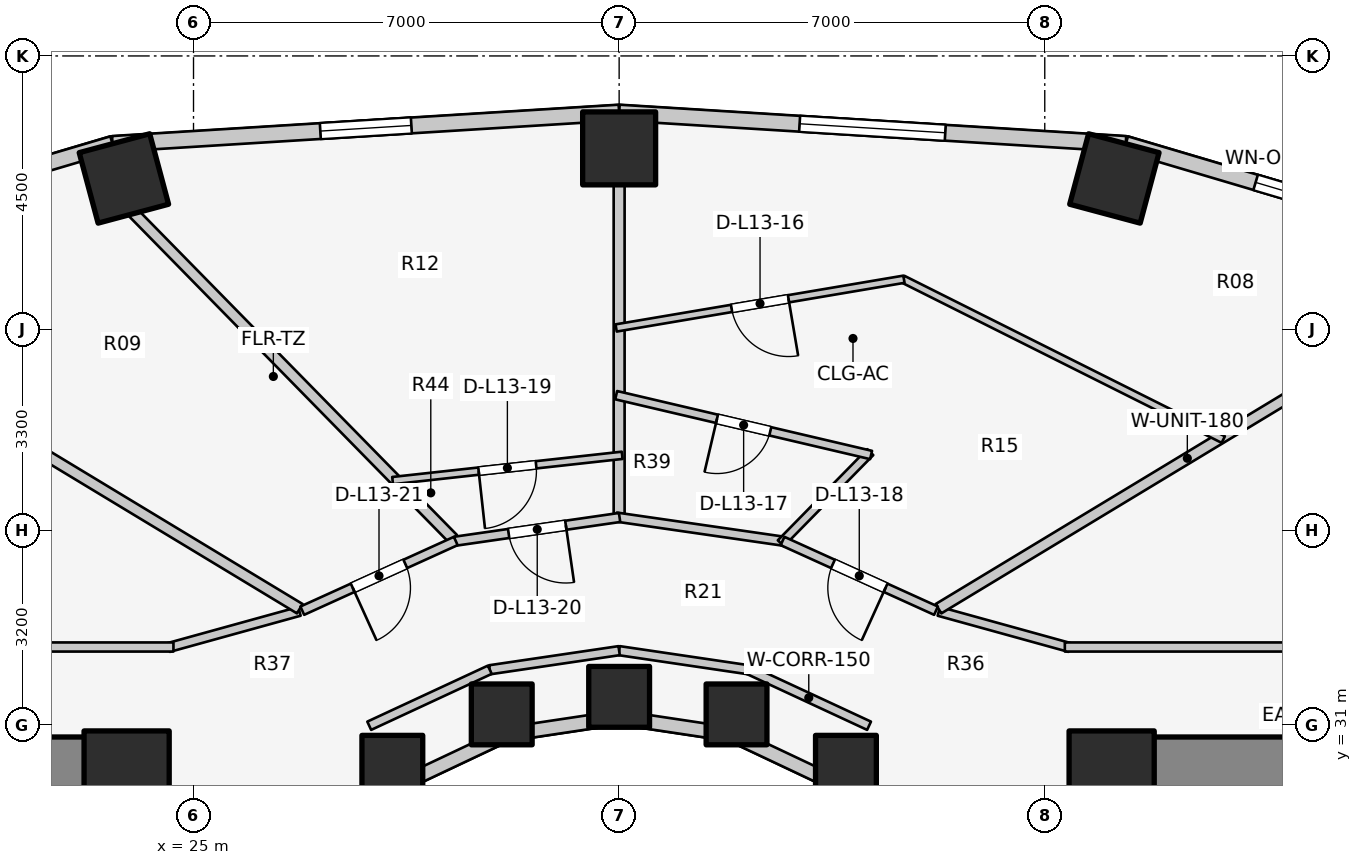
"""IFC4 building model, lengths in metres.
Left out: names, types, materials, properties, quantities, classifications, styles, units other than length and angle.
Written with IfcOpenShell. Run it as: python <this file> out.ifc"""

import sys

from ifc_helpers import new_model, si_unit, direction, frame, frame_2d, origin, origin_2d, place, context, subcontext, project, spatial, rectangle, extrude, element, fill, save


model = new_model("IFC4")
c1 = context("Model", 3, precision=1e-05, world=origin(), true_north=direction((0.0, 1.0)))
c2 = subcontext(c1, "Body", "Model", "MODEL_VIEW")
j1 = project(units=[si_unit("LENGTHUNIT", "METRE"), si_unit("PLANEANGLEUNIT", "RADIAN")], contexts=[c1])
p1 = place(None, origin())
s1 = spatial("IfcSite", under=j1, at=p1, CompositionType="ELEMENT")
p2 = place(p1, origin())
s2 = spatial("IfcBuilding", under=s1, at=p2, CompositionType="ELEMENT")
p3 = place(p2, frame((0.0, 0.0, 46.2)))
s3 = spatial("IfcBuildingStorey", under=s2, at=p3, CompositionType="ELEMENT", Elevation=46.2)
for number, where, z_axis, x_axis in (
    (1, (19.65, 30.35, 0.0), (0.0, 0.0, 1.0), (1.0, 0.0, 0.0)),
    (2, (39.85, 30.35, 0.0), (0.0, 0.0, 1.0), (1.0, 0.0, 0.0)),
):
    element("IfcWall", number, at=place(p3, frame(where, z_axis=z_axis, x_axis=x_axis)), inside=s3, PredefinedType="SHEAR", context=c2, shape_type="SweptSolid", body=[
        extrude(rectangle(XDim=4.5, YDim=0.9, at=frame_2d((2.25, 0.0))), origin(), (0.0, 0.0, 1.0), 3.1),
    ])
for number, where, z_axis, x_axis in (
    (3, (23.9, 30.2, 0.0), (0.0, 0.0, 1.0), (1.0, 0.0, 0.0)),
    (4, (40.1, 30.2, 0.0), (0.0, 0.0, 1.0), (1.0, 0.0, 0.0)),
):
    element("IfcColumn", number, at=place(p3, frame(where, z_axis=z_axis, x_axis=x_axis)), inside=s3, PredefinedType="COLUMN", context=c2, shape_type="SweptSolid", body=[
        extrude(rectangle(XDim=1.4, YDim=1.4, at=origin_2d()), origin(), (0.0, 0.0, 1.0), 3.1),
    ])
for number, where, z_axis, x_axis in (
    (5, (35.73, 30.327, 0.0), (0.0, 0.0, 1.0), (1.0, 0.0, 0.0)),
    (6, (33.931, 31.172, 0.0), (0.0, 0.0, 1.0), (1.0, 0.0, 0.0)),
):
    element("IfcColumn", number, at=place(p3, frame(where, z_axis=z_axis, x_axis=x_axis)), inside=s3, PredefinedType="COLUMN", context=c2, shape_type="SweptSolid", body=[
        extrude(rectangle(XDim=1.0, YDim=1.0, at=origin_2d()), origin(), (0.0, 0.0, 1.0), 3.1),
    ])
p4 = place(p3, frame((40.145, 39.986, 0.0), z_axis=(0.0, 0.0, 1.0), x_axis=(0.258819045103, 0.965925826289, 0.0)))
e7 = element("IfcColumn", 7, at=p4, inside=s3, PredefinedType="COLUMN", context=c2, shape_type="SweptSolid", body=[
    extrude(rectangle(XDim=1.2, YDim=1.2, at=origin_2d()), origin(), (0.0, 0.0, 1.0), 3.1),
])
p5 = place(p3, frame((32.0, 31.46, 0.0), z_axis=(0.0, 0.0, 1.0), x_axis=(1.0, 0.0, 0.0)))
e8 = element("IfcColumn", 8, at=p5, inside=s3, PredefinedType="COLUMN", context=c2, shape_type="SweptSolid", body=[
    extrude(rectangle(XDim=1.0, YDim=1.0, at=origin_2d()), origin(), (0.0, 0.0, 1.0), 3.1),
])
p6 = place(p3, frame((32.0, 40.48, 0.0), z_axis=(0.0, 0.0, 1.0), x_axis=(0.0, 1.0, 0.0)))
e9 = element("IfcColumn", 9, at=p6, inside=s3, PredefinedType="COLUMN", context=c2, shape_type="SweptSolid", body=[
    extrude(rectangle(XDim=1.2, YDim=1.2, at=origin_2d()), origin(), (0.0, 0.0, 1.0), 3.1),
])
p7 = place(p3, frame((30.069, 31.172, 0.0), z_axis=(0.0, 0.0, 1.0), x_axis=(1.0, 0.0, 0.0)))
e10 = element("IfcColumn", 10, at=p7, inside=s3, PredefinedType="COLUMN", context=c2, shape_type="SweptSolid", body=[
    extrude(rectangle(XDim=1.0, YDim=1.0, at=origin_2d()), origin(), (0.0, 0.0, 1.0), 3.1),
])
p8 = place(p3, frame((23.855, 39.986, 0.0), z_axis=(0.0, 0.0, 1.0), x_axis=(-0.258819045103, 0.965925826289, 0.0)))
e11 = element("IfcColumn", 11, at=p8, inside=s3, PredefinedType="COLUMN", context=c2, shape_type="SweptSolid", body=[
    extrude(rectangle(XDim=1.2, YDim=1.2, at=origin_2d()), origin(), (0.0, 0.0, 1.0), 3.1),
])
p9 = place(p3, frame((28.27, 30.327, 0.0), z_axis=(0.0, 0.0, 1.0), x_axis=(1.0, 0.0, 0.0)))
e12 = element("IfcColumn", 12, at=p9, inside=s3, PredefinedType="COLUMN", context=c2, shape_type="SweptSolid", body=[
    extrude(rectangle(XDim=1.0, YDim=1.0, at=origin_2d()), origin(), (0.0, 0.0, 1.0), 3.1),
])
p10 = place(p3, frame((37.035, 28.742, 0.0), z_axis=(0.0, 0.0, 1.0), x_axis=(-0.752576694707, 0.658504607869, 0.0)))
e13 = element("IfcWall", 13, at=p10, inside=s3, PredefinedType="STANDARD", context=c2, shape_type="SweptSolid", body=[
    extrude(rectangle(XDim=1.959, YDim=0.23, at=frame_2d((0.98, 0.0))), origin(), (0.0, 0.0, 1.0), 2.16),
])
p11 = place(p3, frame((35.56, 30.032, 0.0), z_axis=(0.0, 0.0, 1.0), x_axis=(-0.904179699603, 0.427152280606, 0.0)))
e14 = element("IfcWall", 14, at=p11, inside=s3, PredefinedType="STANDARD", context=c2, shape_type="SweptSolid", body=[
    extrude(rectangle(XDim=1.899, YDim=0.23, at=frame_2d((0.95, 0.0))), origin(), (0.0, 0.0, 1.0), 2.16),
])
for number, where, z_axis, x_axis in (
    (15, (33.843, 30.843, 0.0), (0.0, 0.0, 1.0), (-0.989, 0.149, 0.0)),
    (16, (32.0, 31.12, 0.0), (0.0, 0.0, 1.0), (-0.989, -0.149, 0.0)),
):
    element("IfcWall", number, at=place(p3, frame(where, z_axis=z_axis, x_axis=x_axis)), inside=s3, PredefinedType="STANDARD", context=c2, shape_type="SweptSolid", body=[
        extrude(rectangle(XDim=1.864, YDim=0.23, at=frame_2d((0.932, 0.0))), origin(), (0.0, 0.0, 1.0), 2.16),
    ])
p12 = place(p3, frame((30.157, 30.843, 0.0), z_axis=(0.0, 0.0, 1.0), x_axis=(-0.904179699603, -0.427152280606, 0.0)))
e17 = element("IfcWall", 17, at=p12, inside=s3, PredefinedType="STANDARD", context=c2, shape_type="SweptSolid", body=[
    extrude(rectangle(XDim=1.899, YDim=0.23, at=frame_2d((0.95, 0.0))), origin(), (0.0, 0.0, 1.0), 2.16),
])
p13 = place(p3, frame((28.44, 30.032, 0.0), z_axis=(0.0, 0.0, 1.0), x_axis=(-0.752576694707, -0.658504607869, 0.0)))
e18 = element("IfcWall", 18, at=p13, inside=s3, PredefinedType="STANDARD", context=c2, shape_type="SweptSolid", body=[
    extrude(rectangle(XDim=1.959, YDim=0.23, at=frame_2d((0.98, 0.0))), origin(), (0.0, 0.0, 1.0), 2.16),
])
p14 = place(p3, frame((46.042, 38.862, 0.0), z_axis=(0.0, 0.0, 1.0), x_axis=(-0.958843593522, 0.283934786811, 0.0)))
e19 = element("IfcWall", 19, at=p14, inside=s3, PredefinedType="STANDARD", context=c2, shape_type="SweptSolid", body=[
    extrude(rectangle(XDim=5.955, YDim=0.26, at=frame_2d((2.978, 0.0))), origin(), (0.0, 0.0, 1.0), 2.85),
])
p15 = place(p14, frame((2.228, 0.0, 0.75)))
e20 = element("IfcOpeningElement", 20, at=p15, cuts=e19, PredefinedType="OPENING", context=c2, shape_type="SweptSolid", body=[
    extrude(rectangle(XDim=1.5, YDim=1.6, at=frame_2d((0.75, 0.8))), frame((0.0, 0.14, 0.0), z_axis=(0.0, -1.0, 0.0), x_axis=(1.0, 0.0, 0.0)), (0.0, 0.0, 1.0), 0.28),
])
p16 = place(p3, frame((40.332, 40.553, 0.0), z_axis=(0.0, 0.0, 1.0), x_axis=(-0.998090514779, 0.061768311519, 0.0)))
e21 = element("IfcWall", 21, at=p16, inside=s3, PredefinedType="STANDARD", context=c2, shape_type="SweptSolid", body=[
    extrude(rectangle(XDim=8.348, YDim=0.26, at=frame_2d((4.174, 0.0))), origin(), (0.0, 0.0, 1.0), 2.85),
])
p17 = place(p16, frame((2.974, 0.0, 0.75)))
e22 = element("IfcOpeningElement", 22, at=p17, cuts=e21, PredefinedType="OPENING", context=c2, shape_type="SweptSolid", body=[
    extrude(rectangle(XDim=2.4, YDim=1.7, at=frame_2d((1.2, 0.85))), frame((0.0, 0.14, 0.0), z_axis=(0.0, -1.0, 0.0), x_axis=(1.0, 0.0, 0.0)), (0.0, 0.0, 1.0), 0.28),
])
p18 = place(p3, frame((32.0, 41.069, 0.0), z_axis=(0.0, 0.0, 1.0), x_axis=(-0.998090514779, -0.061768311519, 0.0)))
e23 = element("IfcWall", 23, at=p18, inside=s3, PredefinedType="STANDARD", context=c2, shape_type="SweptSolid", body=[
    extrude(rectangle(XDim=8.348, YDim=0.26, at=frame_2d((4.174, 0.0))), origin(), (0.0, 0.0, 1.0), 2.85),
])
p19 = place(p18, frame((3.424, 0.0, 0.75)))
e24 = element("IfcOpeningElement", 24, at=p19, cuts=e23, PredefinedType="OPENING", context=c2, shape_type="SweptSolid", body=[
    extrude(rectangle(XDim=1.5, YDim=1.6, at=frame_2d((0.75, 0.8))), frame((0.0, 0.14, 0.0), z_axis=(0.0, -1.0, 0.0), x_axis=(1.0, 0.0, 0.0)), (0.0, 0.0, 1.0), 0.28),
])
p20 = place(p3, frame((23.668, 40.553, 0.0), z_axis=(0.0, 0.0, 1.0), x_axis=(-0.958843593522, -0.283934786811, 0.0)))
e25 = element("IfcWall", 25, at=p20, inside=s3, PredefinedType="STANDARD", context=c2, shape_type="SweptSolid", body=[
    extrude(rectangle(XDim=5.955, YDim=0.26, at=frame_2d((2.978, 0.0))), origin(), (0.0, 0.0, 1.0), 2.85),
])
p21 = place(p20, frame((2.228, 0.0, 0.75)))
e26 = element("IfcOpeningElement", 26, at=p21, cuts=e25, PredefinedType="OPENING", context=c2, shape_type="SweptSolid", body=[
    extrude(rectangle(XDim=1.5, YDim=1.6, at=frame_2d((0.75, 0.8))), frame((0.0, 0.14, 0.0), z_axis=(0.0, -1.0, 0.0), x_axis=(1.0, 0.0, 0.0)), (0.0, 0.0, 1.0), 0.28),
])
p22 = place(p3, frame((36.11, 30.985, 0.0), z_axis=(0.0, 0.0, 1.0), x_axis=(-0.906943449489, 0.421252393975, 0.0)))
e27 = element("IfcWall", 27, at=p22, inside=s3, PredefinedType="PARTITIONING", context=c2, shape_type="SweptSolid", body=[
    extrude(rectangle(XDim=2.186, YDim=0.15, at=frame_2d((1.093, 0.0))), origin(), (0.0, 0.0, 1.0), 2.237),
])
for number, where, z_axis, x_axis in (
    (28, (34.127, 31.906, 0.0), (0.0, 0.0, 1.0), (-0.989, 0.146, 0.0)),
    (29, (32.0, 32.22, 0.0), (0.0, 0.0, 1.0), (-0.989, -0.146, 0.0)),
):
    element("IfcWall", number, at=place(p3, frame(where, z_axis=z_axis, x_axis=x_axis)), inside=s3, PredefinedType="PARTITIONING", context=c2, shape_type="SweptSolid", body=[
        extrude(rectangle(XDim=2.151, YDim=0.15, at=frame_2d((1.075, 0.0))), origin(), (0.0, 0.0, 1.0), 2.237),
    ])
p23 = place(p3, frame((29.873, 31.906, 0.0), z_axis=(0.0, 0.0, 1.0), x_axis=(-0.906943449489, -0.421252393975, 0.0)))
e30 = element("IfcWall", 30, at=p23, inside=s3, PredefinedType="PARTITIONING", context=c2, shape_type="SweptSolid", body=[
    extrude(rectangle(XDim=2.186, YDim=0.15, at=frame_2d((1.093, 0.0))), origin(), (0.0, 0.0, 1.0), 2.237),
])
p24 = place(p3, frame((37.258, 32.867, 0.0), z_axis=(0.0, 0.0, 1.0), x_axis=(0.963833843713, -0.266503886865, 0.0)))
e31 = element("IfcWall", 31, at=p24, inside=s3, PredefinedType="PARTITIONING", context=c2, shape_type="SweptSolid", body=[
    extrude(rectangle(XDim=2.232, YDim=0.15, at=frame_2d((1.116, 0.0))), origin(), (0.0, 0.0, 1.0), 2.237),
])
p25 = place(p3, frame((39.33, 32.28, 0.0), z_axis=(0.0, 0.0, 1.0), x_axis=(1.0, 0.0, 0.0)))
e32 = element("IfcWall", 32, at=p25, inside=s3, PredefinedType="PARTITIONING", context=c2, shape_type="SweptSolid", body=[
    extrude(rectangle(XDim=7.52, YDim=0.15, at=frame_2d((3.76, 0.0))), origin(), (0.0, 0.0, 1.0), 2.237),
])
p26 = place(p25, frame((5.22, 0.0, 0.0)))
e33 = element("IfcOpeningElement", 33, at=p26, cuts=e32, PredefinedType="OPENING", context=c2, shape_type="SweptSolid", body=[
    extrude(rectangle(XDim=0.9, YDim=2.1, at=frame_2d((0.45, 1.05))), frame((0.0, 0.085, 0.0), z_axis=(0.0, -1.0, 0.0), x_axis=(1.0, 0.0, 0.0)), (0.0, 0.0, 1.0), 0.17),
])
p27 = place(p3, frame((26.742, 32.867, 0.0), z_axis=(0.0, 0.0, 1.0), x_axis=(-0.963833843713, -0.266503886865, 0.0)))
e34 = element("IfcWall", 34, at=p27, inside=s3, PredefinedType="PARTITIONING", context=c2, shape_type="SweptSolid", body=[
    extrude(rectangle(XDim=2.232, YDim=0.15, at=frame_2d((1.116, 0.0))), origin(), (0.0, 0.0, 1.0), 2.237),
])
p28 = place(p3, frame((17.15, 32.28, 0.0), z_axis=(0.0, 0.0, 1.0), x_axis=(1.0, 0.0, 0.0)))
e35 = element("IfcWall", 35, at=p28, inside=s3, PredefinedType="PARTITIONING", context=c2, shape_type="SweptSolid", body=[
    extrude(rectangle(XDim=7.52, YDim=0.15, at=frame_2d((3.76, 0.0))), origin(), (0.0, 0.0, 1.0), 2.237),
])
p29 = place(p28, frame((1.3, 0.0, 0.0)))
e36 = element("IfcOpeningElement", 36, at=p29, cuts=e35, PredefinedType="OPENING", context=c2, shape_type="SweptSolid", body=[
    extrude(rectangle(XDim=0.9, YDim=2.1, at=frame_2d((0.45, 1.05))), frame((0.0, 0.085, 0.0), z_axis=(0.0, -1.0, 0.0), x_axis=(1.0, 0.0, 0.0)), (0.0, 0.0, 1.0), 0.17),
])
p30 = place(p3, frame((37.252, 32.91, 0.0), z_axis=(0.0, 0.0, 1.0), x_axis=(0.855817136021, 0.517278483694, 0.0)))
e37 = element("IfcWall", 37, at=p30, inside=s3, PredefinedType="PARTITIONING", context=c2, shape_type="SweptSolid", body=[
    extrude(rectangle(XDim=9.564, YDim=0.18, at=frame_2d((4.782, 0.0))), origin(), (0.0, 0.0, 1.0), 2.237),
])
p31 = place(p3, frame((32.0, 34.465, 0.0), z_axis=(0.0, 0.0, 1.0), x_axis=(0.0, 1.0, 0.0)))
e38 = element("IfcWall", 38, at=p31, inside=s3, PredefinedType="PARTITIONING", context=c2, shape_type="SweptSolid", body=[
    extrude(rectangle(XDim=5.435, YDim=0.18, at=frame_2d((2.717, 0.0))), origin(), (0.0, 0.0, 1.0), 2.237),
])
p32 = place(p3, frame((29.267, 34.061, 0.0), z_axis=(0.0, 0.0, 1.0), x_axis=(-0.700234780085, 0.713912636644, 0.0)))
e39 = element("IfcWall", 39, at=p32, inside=s3, PredefinedType="PARTITIONING", context=c2, shape_type="SweptSolid", body=[
    extrude(rectangle(XDim=7.515, YDim=0.18, at=frame_2d((3.757, 0.0))), origin(), (0.0, 0.0, 1.0), 2.237),
])
p33 = place(p3, frame((26.748, 32.91, 0.0), z_axis=(0.0, 0.0, 1.0), x_axis=(-0.855817136021, 0.517278483694, 0.0)))
e40 = element("IfcWall", 40, at=p33, inside=s3, PredefinedType="PARTITIONING", context=c2, shape_type="SweptSolid", body=[
    extrude(rectangle(XDim=9.564, YDim=0.18, at=frame_2d((4.782, 0.0))), origin(), (0.0, 0.0, 1.0), 2.237),
])
p34 = place(p3, frame((41.936, 35.691, 0.0), z_axis=(0.0, 0.0, 1.0), x_axis=(-0.894128783551, 0.447809913274, 0.0)))
e41 = element("IfcWall", 41, at=p34, inside=s3, PredefinedType="MOVABLE", context=c2, shape_type="SweptSolid", body=[
    extrude(rectangle(XDim=5.895, YDim=0.12, at=frame_2d((2.947, 0.0))), origin(), (0.0, 0.0, 1.0), 2.237),
])
p35 = place(p3, frame((36.684, 38.328, 0.0), z_axis=(0.0, 0.0, 1.0), x_axis=(-0.985971487104, -0.166913829921, 0.0)))
e42 = element("IfcWall", 42, at=p35, inside=s3, PredefinedType="MOVABLE", context=c2, shape_type="SweptSolid", body=[
    extrude(rectangle(XDim=4.801, YDim=0.12, at=frame_2d((2.4, 0.0))), origin(), (0.0, 0.0, 1.0), 2.237),
])
p36 = place(p35, frame((1.925, 0.0, 0.0)))
e43 = element("IfcOpeningElement", 43, at=p36, cuts=e42, PredefinedType="OPENING", context=c2, shape_type="SweptSolid", body=[
    extrude(rectangle(XDim=0.95, YDim=2.1, at=frame_2d((0.475, 1.05))), frame((0.0, 0.07, 0.0), z_axis=(0.0, -1.0, 0.0), x_axis=(1.0, 0.0, 0.0)), (0.0, 0.0, 1.0), 0.14),
])
p37 = place(p3, frame((34.744, 34.014, 0.0), z_axis=(0.0, 0.0, 1.0), x_axis=(-0.989761784218, 0.142729150844, 0.0)))
e44 = element("IfcWall", 44, at=p37, inside=s3, PredefinedType="PARTITIONING", context=c2, shape_type="SweptSolid", body=[
    extrude(rectangle(XDim=2.822, YDim=0.15, at=frame_2d((1.411, 0.0))), origin(), (0.0, 0.0, 1.0), 2.237),
])
p38 = place(p3, frame((34.659, 33.986, 0.0), z_axis=(0.0, 0.0, 1.0), x_axis=(0.700331728855, 0.713817532398, 0.0)))
e45 = element("IfcWall", 45, at=p38, inside=s3, PredefinedType="PLUMBINGWALL", context=c2, shape_type="SweptSolid", body=[
    extrude(rectangle(XDim=2.1, YDim=0.14, at=frame_2d((1.05, 0.0))), origin(), (0.0, 0.0, 1.0), 2.385),
])
p39 = place(p3, frame((36.144, 35.438, 0.0), z_axis=(0.0, 0.0, 1.0), x_axis=(-0.973546394015, 0.228489427982, 0.0)))
e46 = element("IfcWall", 46, at=p39, inside=s3, PredefinedType="PLUMBINGWALL", context=c2, shape_type="SweptSolid", body=[
    extrude(rectangle(XDim=4.306, YDim=0.14, at=frame_2d((2.153, 0.0))), origin(), (0.0, 0.0, 1.0), 2.237),
])
p40 = place(p39, frame((1.703, 0.0, 0.0)))
e47 = element("IfcOpeningElement", 47, at=p40, cuts=e46, PredefinedType="OPENING", context=c2, shape_type="SweptSolid", body=[
    extrude(rectangle(XDim=0.9, YDim=2.1, at=frame_2d((0.45, 1.05))), frame((0.0, 0.08, 0.0), z_axis=(0.0, -1.0, 0.0), x_axis=(1.0, 0.0, 0.0)), (0.0, 0.0, 1.0), 0.16),
])
p41 = place(p3, frame((37.211, 32.877, 0.0), z_axis=(0.0, 0.0, 1.0), x_axis=(-0.910568469686, 0.41335827319, 0.0)))
e48 = element("IfcWall", 48, at=p41, inside=s3, PredefinedType="PARTITIONING", context=c2, shape_type="SweptSolid", body=[
    extrude(rectangle(XDim=2.772, YDim=0.15, at=frame_2d((1.386, 0.0))), origin(), (0.0, 0.0, 1.0), 2.237),
])
p42 = place(p41, frame((0.911, 0.0, 0.0)))
e49 = element("IfcOpeningElement", 49, at=p42, cuts=e48, PredefinedType="OPENING", context=c2, shape_type="SweptSolid", body=[
    extrude(rectangle(XDim=0.95, YDim=2.1, at=frame_2d((0.475, 1.05))), frame((0.0, 0.085, 0.0), z_axis=(0.0, -1.0, 0.0), x_axis=(1.0, 0.0, 0.0)), (0.0, 0.0, 1.0), 0.17),
])
p43 = place(p3, frame((32.05, 35.432, 0.0), z_axis=(0.0, 0.0, 1.0), x_axis=(-0.993997647441, -0.109401448263, 0.0)))
e50 = element("IfcWall", 50, at=p43, inside=s3, PredefinedType="MOVABLE", context=c2, shape_type="SweptSolid", body=[
    extrude(rectangle(XDim=3.798, YDim=0.12, at=frame_2d((1.899, 0.0))), origin(), (0.0, 0.0, 1.0), 2.237),
])
p44 = place(p43, frame((1.424, 0.0, 0.0)))
e51 = element("IfcOpeningElement", 51, at=p44, cuts=e50, PredefinedType="OPENING", context=c2, shape_type="SweptSolid", body=[
    extrude(rectangle(XDim=0.95, YDim=2.1, at=frame_2d((0.475, 1.05))), frame((0.0, 0.07, 0.0), z_axis=(0.0, -1.0, 0.0), x_axis=(1.0, 0.0, 0.0)), (0.0, 0.0, 1.0), 0.14),
])
p45 = place(p3, frame((32.007, 34.41, 0.0), z_axis=(0.0, 0.0, 1.0), x_axis=(-0.989748682384, -0.142819976611, 0.0)))
e52 = element("IfcWall", 52, at=p45, inside=s3, PredefinedType="PARTITIONING", context=c2, shape_type="SweptSolid", body=[
    extrude(rectangle(XDim=2.737, YDim=0.15, at=frame_2d((1.368, 0.0))), origin(), (0.0, 0.0, 1.0), 2.237),
])
p46 = place(p45, frame((0.893, 0.0, 0.0)))
e53 = element("IfcOpeningElement", 53, at=p46, cuts=e52, PredefinedType="OPENING", context=c2, shape_type="SweptSolid", body=[
    extrude(rectangle(XDim=0.95, YDim=2.1, at=frame_2d((0.475, 1.05))), frame((0.0, 0.085, 0.0), z_axis=(0.0, -1.0, 0.0), x_axis=(1.0, 0.0, 0.0)), (0.0, 0.0, 1.0), 0.17),
])
p47 = place(p3, frame((29.313, 34.023, 0.0), z_axis=(0.0, 0.0, 1.0), x_axis=(-0.910568469686, -0.41335827319, 0.0)))
e54 = element("IfcWall", 54, at=p47, inside=s3, PredefinedType="PARTITIONING", context=c2, shape_type="SweptSolid", body=[
    extrude(rectangle(XDim=2.772, YDim=0.15, at=frame_2d((1.386, 0.0))), origin(), (0.0, 0.0, 1.0), 2.237),
])
p48 = place(p47, frame((0.911, 0.0, 0.0)))
e55 = element("IfcOpeningElement", 55, at=p48, cuts=e54, PredefinedType="OPENING", context=c2, shape_type="SweptSolid", body=[
    extrude(rectangle(XDim=0.95, YDim=2.1, at=frame_2d((0.475, 1.05))), frame((0.0, 0.085, 0.0), z_axis=(0.0, -1.0, 0.0), x_axis=(1.0, 0.0, 0.0)), (0.0, 0.0, 1.0), 0.17),
])
p49 = place(p15, origin())
e56 = element("IfcWindow", 56, at=p49, inside=s3, PartitioningType="SINGLE_PANEL", PredefinedType="WINDOW", context=c2, shape_type="SweptSolid", body=[
    extrude(rectangle(XDim=1.5, YDim=1.6, at=frame_2d((0.75, 0.8))), frame((0.0, 0.03, 0.0), z_axis=(0.0, -1.0, 0.0), x_axis=(1.0, 0.0, 0.0)), (0.0, 0.0, 1.0), 0.06),
])
fill(e20, e56)
p50 = place(p17, origin())
e57 = element("IfcWindow", 57, at=p50, inside=s3, PartitioningType="SINGLE_PANEL", PredefinedType="WINDOW", context=c2, shape_type="SweptSolid", body=[
    extrude(rectangle(XDim=2.4, YDim=1.7, at=frame_2d((1.2, 0.85))), frame((0.0, 0.03, 0.0), z_axis=(0.0, -1.0, 0.0), x_axis=(1.0, 0.0, 0.0)), (0.0, 0.0, 1.0), 0.06),
])
fill(e22, e57)
p51 = place(p19, origin())
e58 = element("IfcWindow", 58, at=p51, inside=s3, PartitioningType="SINGLE_PANEL", PredefinedType="WINDOW", context=c2, shape_type="SweptSolid", body=[
    extrude(rectangle(XDim=1.5, YDim=1.6, at=frame_2d((0.75, 0.8))), frame((0.0, 0.03, 0.0), z_axis=(0.0, -1.0, 0.0), x_axis=(1.0, 0.0, 0.0)), (0.0, 0.0, 1.0), 0.06),
])
fill(e24, e58)
p52 = place(p36, origin())
e59 = element("IfcDoor", 59, at=p52, inside=s3, OperationType="SINGLE_SWING_LEFT", PredefinedType="DOOR", context=c2, shape_type="SweptSolid", body=[
    extrude(rectangle(XDim=0.95, YDim=2.1, at=frame_2d((0.475, 1.05))), frame((0.0, 0.025, 0.0), z_axis=(0.0, -1.0, 0.0), x_axis=(1.0, 0.0, 0.0)), (0.0, 0.0, 1.0), 0.05),
])
fill(e43, e59)
p53 = place(p40, origin())
e60 = element("IfcDoor", 60, at=p53, inside=s3, OperationType="SINGLE_SWING_RIGHT", PredefinedType="DOOR", context=c2, shape_type="SweptSolid", body=[
    extrude(rectangle(XDim=0.9, YDim=2.1, at=frame_2d((0.45, 1.05))), frame((0.0, 0.025, 0.0), z_axis=(0.0, -1.0, 0.0), x_axis=(1.0, 0.0, 0.0)), (0.0, 0.0, 1.0), 0.05),
])
fill(e47, e60)
p54 = place(p42, origin())
e61 = element("IfcDoor", 61, at=p54, inside=s3, OperationType="SINGLE_SWING_LEFT", PredefinedType="DOOR", context=c2, shape_type="SweptSolid", body=[
    extrude(rectangle(XDim=0.95, YDim=2.1, at=frame_2d((0.475, 1.05))), frame((0.0, 0.025, 0.0), z_axis=(0.0, -1.0, 0.0), x_axis=(1.0, 0.0, 0.0)), (0.0, 0.0, 1.0), 0.05),
])
fill(e49, e61)
p55 = place(p44, origin())
e62 = element("IfcDoor", 62, at=p55, inside=s3, OperationType="SINGLE_SWING_RIGHT", PredefinedType="DOOR", context=c2, shape_type="SweptSolid", body=[
    extrude(rectangle(XDim=0.95, YDim=2.1, at=frame_2d((0.475, 1.05))), frame((0.0, 0.025, 0.0), z_axis=(0.0, -1.0, 0.0), x_axis=(1.0, 0.0, 0.0)), (0.0, 0.0, 1.0), 0.05),
])
fill(e51, e62)
p56 = place(p46, origin())
e63 = element("IfcDoor", 63, at=p56, inside=s3, OperationType="SINGLE_SWING_LEFT", PredefinedType="DOOR", context=c2, shape_type="SweptSolid", body=[
    extrude(rectangle(XDim=0.95, YDim=2.1, at=frame_2d((0.475, 1.05))), frame((0.0, 0.025, 0.0), z_axis=(0.0, -1.0, 0.0), x_axis=(1.0, 0.0, 0.0)), (0.0, 0.0, 1.0), 0.05),
])
fill(e53, e63)
p57 = place(p48, origin())
e64 = element("IfcDoor", 64, at=p57, inside=s3, OperationType="SINGLE_SWING_RIGHT", PredefinedType="DOOR", context=c2, shape_type="SweptSolid", body=[
    extrude(rectangle(XDim=0.95, YDim=2.1, at=frame_2d((0.475, 1.05))), frame((0.0, 0.025, 0.0), z_axis=(0.0, -1.0, 0.0), x_axis=(1.0, 0.0, 0.0)), (0.0, 0.0, 1.0), 0.05),
])
fill(e55, e64)
save(model, sys.argv[1])
